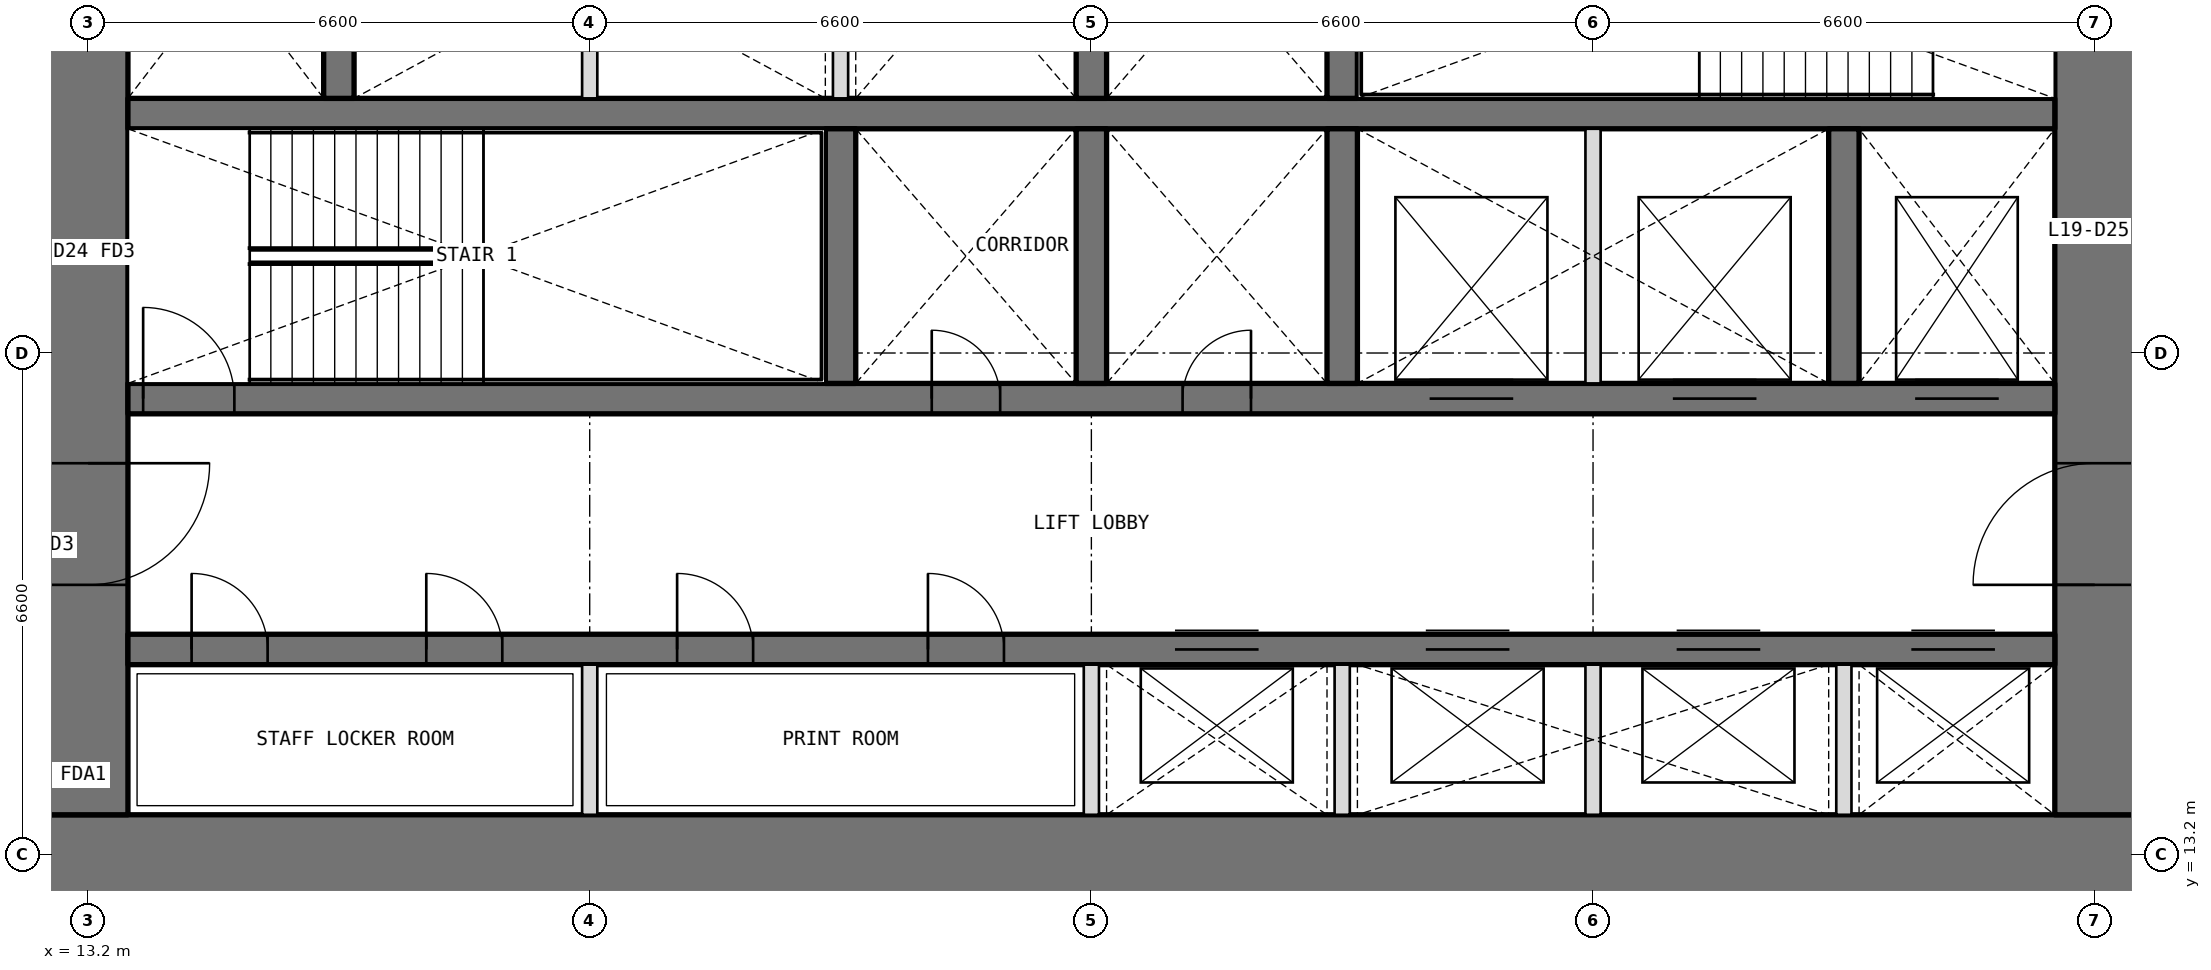
"""IFC4 building model, lengths in metres.
Left out: names, types, materials, properties, quantities, classifications, styles, units other than length and angle.
Written with IfcOpenShell. Run it as: python <this file> out.ifc"""

import sys

from ifc_helpers import new_model, si_unit, direction, frame, frame_2d, origin, place, context, subcontext, project, spatial, rectangle, extrude, element, fill, save


model = new_model("IFC4")
c1 = context("Model", 3, precision=1e-05, world=origin(), true_north=direction((0.0, 1.0)))
c2 = subcontext(c1, "Body", "Model", "MODEL_VIEW")
j1 = project(units=[si_unit("LENGTHUNIT", "METRE"), si_unit("PLANEANGLEUNIT", "RADIAN")], contexts=[c1])
p1 = place(None, origin())
s1 = spatial("IfcSite", under=j1, at=p1, CompositionType="ELEMENT")
p2 = place(p1, origin())
s2 = spatial("IfcBuilding", under=s1, at=p2, CompositionType="ELEMENT")
p3 = place(p2, frame((0.0, 0.0, 86.4)))
s3 = spatial("IfcBuildingStorey", under=s2, at=p3, CompositionType="ELEMENT", Elevation=86.4)
p4 = place(p3, frame((12.675, 13.2, 0.0), z_axis=(0.0, 0.0, 1.0), x_axis=(1.0, 0.0, 0.0)))
e1 = element("IfcWall", 1, at=p4, inside=s3, PredefinedType="SHEAR", context=c2, shape_type="SweptSolid", body=[
    extrude(rectangle(XDim=27.45, YDim=1.05, at=frame_2d((13.725, 0.0))), origin(), (0.0, 0.0, 1.0), 4.2),
])
p5 = place(p3, frame((39.6, 13.725, 0.0), z_axis=(0.0, 0.0, 1.0), x_axis=(0.0, 1.0, 0.0)))
e2 = element("IfcWall", 2, at=p5, inside=s3, PredefinedType="SHEAR", context=c2, shape_type="SweptSolid", body=[
    extrude(rectangle(XDim=18.75, YDim=1.05, at=frame_2d((9.375, 0.0))), origin(), (0.0, 0.0, 1.0), 4.2),
])
p6 = place(p5, frame((3.025, 0.0, 0.0)))
e3 = element("IfcOpeningElement", 3, at=p6, cuts=e2, PredefinedType="OPENING", context=c2, shape_type="SweptSolid", body=[
    extrude(rectangle(XDim=1.6, YDim=2.1, at=frame_2d((0.8, 1.05))), frame((0.0, 0.535, 0.0), z_axis=(0.0, -1.0, 0.0), x_axis=(1.0, 0.0, 0.0)), (0.0, 0.0, 1.0), 1.07),
])
p7 = place(p5, frame((13.825, 0.0, 0.0)))
e4 = element("IfcOpeningElement", 4, at=p7, cuts=e2, PredefinedType="OPENING", context=c2, shape_type="SweptSolid", body=[
    extrude(rectangle(XDim=1.6, YDim=2.1, at=frame_2d((0.8, 1.05))), frame((0.0, 0.535, 0.0), z_axis=(0.0, -1.0, 0.0), x_axis=(1.0, 0.0, 0.0)), (0.0, 0.0, 1.0), 1.07),
])
p8 = place(p3, frame((13.2, 32.475, 0.0), z_axis=(0.0, 0.0, 1.0), x_axis=(0.0, -1.0, 0.0)))
e5 = element("IfcWall", 5, at=p8, inside=s3, PredefinedType="SHEAR", context=c2, shape_type="SweptSolid", body=[
    extrude(rectangle(XDim=18.75, YDim=1.05, at=frame_2d((9.375, 0.0))), origin(), (0.0, 0.0, 1.0), 4.2),
])
p9 = place(p8, frame((14.125, 0.0, 0.0)))
e6 = element("IfcOpeningElement", 6, at=p9, cuts=e5, PredefinedType="OPENING", context=c2, shape_type="SweptSolid", body=[
    extrude(rectangle(XDim=1.6, YDim=2.1, at=frame_2d((0.8, 1.05))), frame((0.0, 0.535, 0.0), z_axis=(0.0, -1.0, 0.0), x_axis=(1.0, 0.0, 0.0)), (0.0, 0.0, 1.0), 1.07),
])
p10 = place(p8, frame((3.325, 0.0, 0.0)))
e7 = element("IfcOpeningElement", 7, at=p10, cuts=e5, PredefinedType="OPENING", context=c2, shape_type="SweptSolid", body=[
    extrude(rectangle(XDim=1.6, YDim=2.1, at=frame_2d((0.8, 1.05))), frame((0.0, 0.535, 0.0), z_axis=(0.0, -1.0, 0.0), x_axis=(1.0, 0.0, 0.0)), (0.0, 0.0, 1.0), 1.07),
])
p11 = place(p3, frame((13.725, 15.9, 0.0), z_axis=(0.0, 0.0, 1.0), x_axis=(1.0, 0.0, 0.0)))
e8 = element("IfcWall", 8, at=p11, inside=s3, PredefinedType="SHEAR", context=c2, shape_type="SweptSolid", body=[
    extrude(rectangle(XDim=25.35, YDim=0.4, at=frame_2d((12.675, 0.0))), origin(), (0.0, 0.0, 1.0), 4.2),
])
p12 = place(p11, frame((0.837, 0.0, 0.0)))
e9 = element("IfcOpeningElement", 9, at=p12, cuts=e8, PredefinedType="OPENING", context=c2, shape_type="SweptSolid", body=[
    extrude(rectangle(XDim=1.0, YDim=2.1, at=frame_2d((0.5, 1.05))), frame((0.0, 0.21, 0.0), z_axis=(0.0, -1.0, 0.0), x_axis=(1.0, 0.0, 0.0)), (0.0, 0.0, 1.0), 0.42),
])
p13 = place(p11, frame((3.925, 0.0, 0.0)))
e10 = element("IfcOpeningElement", 10, at=p13, cuts=e8, PredefinedType="OPENING", context=c2, shape_type="SweptSolid", body=[
    extrude(rectangle(XDim=1.0, YDim=2.1, at=frame_2d((0.5, 1.05))), frame((0.0, 0.21, 0.0), z_axis=(0.0, -1.0, 0.0), x_axis=(1.0, 0.0, 0.0)), (0.0, 0.0, 1.0), 0.42),
])
p14 = place(p11, frame((7.225, 0.0, 0.0)))
e11 = element("IfcOpeningElement", 11, at=p14, cuts=e8, PredefinedType="OPENING", context=c2, shape_type="SweptSolid", body=[
    extrude(rectangle(XDim=1.0, YDim=2.1, at=frame_2d((0.5, 1.05))), frame((0.0, 0.21, 0.0), z_axis=(0.0, -1.0, 0.0), x_axis=(1.0, 0.0, 0.0)), (0.0, 0.0, 1.0), 0.42),
])
p15 = place(p11, frame((10.525, 0.0, 0.0)))
e12 = element("IfcOpeningElement", 12, at=p15, cuts=e8, PredefinedType="OPENING", context=c2, shape_type="SweptSolid", body=[
    extrude(rectangle(XDim=1.0, YDim=2.1, at=frame_2d((0.5, 1.05))), frame((0.0, 0.21, 0.0), z_axis=(0.0, -1.0, 0.0), x_axis=(1.0, 0.0, 0.0)), (0.0, 0.0, 1.0), 0.42),
])
p16 = place(p11, frame((13.775, 0.0, 0.0)))
e13 = element("IfcOpeningElement", 13, at=p16, cuts=e8, PredefinedType="OPENING", context=c2, shape_type="SweptSolid", body=[
    extrude(rectangle(XDim=1.1, YDim=2.1, at=frame_2d((0.55, 1.05))), frame((0.0, 0.21, 0.0), z_axis=(0.0, -1.0, 0.0), x_axis=(1.0, 0.0, 0.0)), (0.0, 0.0, 1.0), 0.42),
])
p17 = place(p11, frame((17.075, 0.0, 0.0)))
e14 = element("IfcOpeningElement", 14, at=p17, cuts=e8, PredefinedType="OPENING", context=c2, shape_type="SweptSolid", body=[
    extrude(rectangle(XDim=1.1, YDim=2.1, at=frame_2d((0.55, 1.05))), frame((0.0, 0.21, 0.0), z_axis=(0.0, -1.0, 0.0), x_axis=(1.0, 0.0, 0.0)), (0.0, 0.0, 1.0), 0.42),
])
p18 = place(p11, frame((20.375, 0.0, 0.0)))
e15 = element("IfcOpeningElement", 15, at=p18, cuts=e8, PredefinedType="OPENING", context=c2, shape_type="SweptSolid", body=[
    extrude(rectangle(XDim=1.1, YDim=2.1, at=frame_2d((0.55, 1.05))), frame((0.0, 0.21, 0.0), z_axis=(0.0, -1.0, 0.0), x_axis=(1.0, 0.0, 0.0)), (0.0, 0.0, 1.0), 0.42),
])
p19 = place(p11, frame((23.462, 0.0, 0.0)))
e16 = element("IfcOpeningElement", 16, at=p19, cuts=e8, PredefinedType="OPENING", context=c2, shape_type="SweptSolid", body=[
    extrude(rectangle(XDim=1.1, YDim=2.1, at=frame_2d((0.55, 1.05))), frame((0.0, 0.21, 0.0), z_axis=(0.0, -1.0, 0.0), x_axis=(1.0, 0.0, 0.0)), (0.0, 0.0, 1.0), 0.42),
])
p20 = place(p3, frame((13.725, 19.2, 0.0), z_axis=(0.0, 0.0, 1.0), x_axis=(1.0, 0.0, 0.0)))
e17 = element("IfcWall", 17, at=p20, inside=s3, PredefinedType="SHEAR", context=c2, shape_type="SweptSolid", body=[
    extrude(rectangle(XDim=25.35, YDim=0.4, at=frame_2d((12.675, 0.0))), origin(), (0.0, 0.0, 1.0), 4.2),
])
p21 = place(p20, frame((10.575, 0.0, 0.0)))
e18 = element("IfcOpeningElement", 18, at=p21, cuts=e17, PredefinedType="OPENING", context=c2, shape_type="SweptSolid", body=[
    extrude(rectangle(XDim=0.9, YDim=2.1, at=frame_2d((0.45, 1.05))), frame((0.0, 0.21, 0.0), z_axis=(0.0, -1.0, 0.0), x_axis=(1.0, 0.0, 0.0)), (0.0, 0.0, 1.0), 0.42),
])
p22 = place(p20, frame((13.875, 0.0, 0.0)))
e19 = element("IfcOpeningElement", 19, at=p22, cuts=e17, PredefinedType="OPENING", context=c2, shape_type="SweptSolid", body=[
    extrude(rectangle(XDim=0.9, YDim=2.1, at=frame_2d((0.45, 1.05))), frame((0.0, 0.21, 0.0), z_axis=(0.0, -1.0, 0.0), x_axis=(1.0, 0.0, 0.0)), (0.0, 0.0, 1.0), 0.42),
])
p23 = place(p20, frame((0.2, 0.0, 0.0)))
e20 = element("IfcOpeningElement", 20, at=p23, cuts=e17, PredefinedType="OPENING", context=c2, shape_type="SweptSolid", body=[
    extrude(rectangle(XDim=1.2, YDim=2.1, at=frame_2d((0.6, 1.05))), frame((0.0, 0.21, 0.0), z_axis=(0.0, -1.0, 0.0), x_axis=(1.0, 0.0, 0.0)), (0.0, 0.0, 1.0), 0.42),
])
p24 = place(p20, frame((23.512, 0.0, 0.0)))
e21 = element("IfcOpeningElement", 21, at=p24, cuts=e17, PredefinedType="OPENING", context=c2, shape_type="SweptSolid", body=[
    extrude(rectangle(XDim=1.1, YDim=2.1, at=frame_2d((0.55, 1.05))), frame((0.0, 0.21, 0.0), z_axis=(0.0, -1.0, 0.0), x_axis=(1.0, 0.0, 0.0)), (0.0, 0.0, 1.0), 0.42),
])
p25 = place(p20, frame((17.125, 0.0, 0.0)))
e22 = element("IfcOpeningElement", 22, at=p25, cuts=e17, PredefinedType="OPENING", context=c2, shape_type="SweptSolid", body=[
    extrude(rectangle(XDim=1.1, YDim=2.1, at=frame_2d((0.55, 1.05))), frame((0.0, 0.21, 0.0), z_axis=(0.0, -1.0, 0.0), x_axis=(1.0, 0.0, 0.0)), (0.0, 0.0, 1.0), 0.42),
])
p26 = place(p20, frame((20.325, 0.0, 0.0)))
e23 = element("IfcOpeningElement", 23, at=p26, cuts=e17, PredefinedType="OPENING", context=c2, shape_type="SweptSolid", body=[
    extrude(rectangle(XDim=1.1, YDim=2.1, at=frame_2d((0.55, 1.05))), frame((0.0, 0.21, 0.0), z_axis=(0.0, -1.0, 0.0), x_axis=(1.0, 0.0, 0.0)), (0.0, 0.0, 1.0), 0.42),
])
p27 = place(p3, frame((13.725, 22.95, 0.0), z_axis=(0.0, 0.0, 1.0), x_axis=(1.0, 0.0, 0.0)))
e24 = element("IfcWall", 24, at=p27, inside=s3, PredefinedType="SHEAR", context=c2, shape_type="SweptSolid", body=[
    extrude(rectangle(XDim=25.35, YDim=0.4, at=frame_2d((12.675, 0.0))), origin(), (0.0, 0.0, 1.0), 4.2),
])
for number, where, z_axis, x_axis in (
    (25, (23.1, 19.4, 0.0), (0.0, 0.0, 1.0), (0.0, 1.0, 0.0)),
    (26, (26.4, 19.4, 0.0), (0.0, 0.0, 1.0), (0.0, 1.0, 0.0)),
    (27, (29.7, 19.4, 0.0), (0.0, 0.0, 1.0), (0.0, 1.0, 0.0)),
    (28, (36.3, 19.4, 0.0), (0.0, 0.0, 1.0), (0.0, 1.0, 0.0)),
    (29, (16.5, 23.15, 0.0), (0.0, 0.0, 1.0), (0.0, 1.0, 0.0)),
    (30, (26.4, 23.15, 0.0), (0.0, 0.0, 1.0), (0.0, 1.0, 0.0)),
    (31, (29.7, 23.15, 0.0), (0.0, 0.0, 1.0), (0.0, 1.0, 0.0)),
):
    element("IfcWall", number, at=place(p3, frame(where, z_axis=z_axis, x_axis=x_axis)), inside=s3, PredefinedType="SHEAR", context=c2, shape_type="SweptSolid", body=[
        extrude(rectangle(XDim=3.35, YDim=0.4, at=frame_2d((1.675, 0.0))), origin(), (0.0, 0.0, 1.0), 4.2),
    ])
for number, where, z_axis, x_axis in (
    (32, (19.8, 13.725, 0.0), (0.0, 0.0, 1.0), (0.0, 1.0, 0.0)),
    (33, (26.4, 13.725, 0.0), (0.0, 0.0, 1.0), (0.0, 1.0, 0.0)),
    (34, (29.7, 13.725, 0.0), (0.0, 0.0, 1.0), (0.0, 1.0, 0.0)),
    (35, (33.0, 13.725, 0.0), (0.0, 0.0, 1.0), (0.0, 1.0, 0.0)),
    (36, (36.3, 13.725, 0.0), (0.0, 0.0, 1.0), (0.0, 1.0, 0.0)),
):
    element("IfcWall", number, at=place(p3, frame(where, z_axis=z_axis, x_axis=x_axis)), inside=s3, PredefinedType="PARTITIONING", context=c2, shape_type="SweptSolid", body=[
        extrude(rectangle(XDim=1.975, YDim=0.2, at=frame_2d((0.987, 0.0))), origin(), (0.0, 0.0, 1.0), 4.2),
    ])
for number, where, z_axis, x_axis in (
    (37, (33.0, 19.4, 0.0), (0.0, 0.0, 1.0), (0.0, 1.0, 0.0)),
    (38, (19.8, 23.15, 0.0), (0.0, 0.0, 1.0), (0.0, 1.0, 0.0)),
    (39, (23.1, 23.15, 0.0), (0.0, 0.0, 1.0), (0.0, 1.0, 0.0)),
):
    element("IfcWall", number, at=place(p3, frame(where, z_axis=z_axis, x_axis=x_axis)), inside=s3, PredefinedType="PARTITIONING", context=c2, shape_type="SweptSolid", body=[
        extrude(rectangle(XDim=3.35, YDim=0.2, at=frame_2d((1.675, 0.0))), origin(), (0.0, 0.0, 1.0), 4.2),
    ])
p28 = place(p21, origin())
e40 = element("IfcDoor", 40, at=p28, inside=s3, OperationType="SINGLE_SWING_LEFT", PredefinedType="DOOR", context=c2, shape_type="SweptSolid", body=[
    extrude(rectangle(XDim=0.9, YDim=2.1, at=frame_2d((0.45, 1.05))), frame((0.0, 0.025, 0.0), z_axis=(0.0, -1.0, 0.0), x_axis=(1.0, 0.0, 0.0)), (0.0, 0.0, 1.0), 0.05),
])
fill(e18, e40)
p29 = place(p22, origin())
e41 = element("IfcDoor", 41, at=p29, inside=s3, OperationType="SINGLE_SWING_RIGHT", PredefinedType="DOOR", context=c2, shape_type="SweptSolid", body=[
    extrude(rectangle(XDim=0.9, YDim=2.1, at=frame_2d((0.45, 1.05))), frame((0.0, 0.025, 0.0), z_axis=(0.0, -1.0, 0.0), x_axis=(1.0, 0.0, 0.0)), (0.0, 0.0, 1.0), 0.05),
])
fill(e19, e41)
p30 = place(p12, origin())
e42 = element("IfcDoor", 42, at=p30, inside=s3, OperationType="SINGLE_SWING_LEFT", PredefinedType="DOOR", context=c2, shape_type="SweptSolid", body=[
    extrude(rectangle(XDim=1.0, YDim=2.1, at=frame_2d((0.5, 1.05))), frame((0.0, 0.025, 0.0), z_axis=(0.0, -1.0, 0.0), x_axis=(1.0, 0.0, 0.0)), (0.0, 0.0, 1.0), 0.05),
])
fill(e9, e42)
p31 = place(p13, origin())
e43 = element("IfcDoor", 43, at=p31, inside=s3, OperationType="SINGLE_SWING_LEFT", PredefinedType="DOOR", context=c2, shape_type="SweptSolid", body=[
    extrude(rectangle(XDim=1.0, YDim=2.1, at=frame_2d((0.5, 1.05))), frame((0.0, 0.025, 0.0), z_axis=(0.0, -1.0, 0.0), x_axis=(1.0, 0.0, 0.0)), (0.0, 0.0, 1.0), 0.05),
])
fill(e10, e43)
p32 = place(p14, origin())
e44 = element("IfcDoor", 44, at=p32, inside=s3, OperationType="SINGLE_SWING_LEFT", PredefinedType="DOOR", context=c2, shape_type="SweptSolid", body=[
    extrude(rectangle(XDim=1.0, YDim=2.1, at=frame_2d((0.5, 1.05))), frame((0.0, 0.025, 0.0), z_axis=(0.0, -1.0, 0.0), x_axis=(1.0, 0.0, 0.0)), (0.0, 0.0, 1.0), 0.05),
])
fill(e11, e44)
p33 = place(p15, origin())
e45 = element("IfcDoor", 45, at=p33, inside=s3, OperationType="SINGLE_SWING_LEFT", PredefinedType="DOOR", context=c2, shape_type="SweptSolid", body=[
    extrude(rectangle(XDim=1.0, YDim=2.1, at=frame_2d((0.5, 1.05))), frame((0.0, 0.025, 0.0), z_axis=(0.0, -1.0, 0.0), x_axis=(1.0, 0.0, 0.0)), (0.0, 0.0, 1.0), 0.05),
])
fill(e12, e45)
p34 = place(p23, origin())
e46 = element("IfcDoor", 46, at=p34, inside=s3, OperationType="SINGLE_SWING_LEFT", PredefinedType="DOOR", context=c2, shape_type="SweptSolid", body=[
    extrude(rectangle(XDim=1.2, YDim=2.1, at=frame_2d((0.6, 1.05))), frame((0.0, 0.025, 0.0), z_axis=(0.0, -1.0, 0.0), x_axis=(1.0, 0.0, 0.0)), (0.0, 0.0, 1.0), 0.05),
])
fill(e20, e46)
p35 = place(p9, origin())
e47 = element("IfcDoor", 47, at=p35, inside=s3, OperationType="DOUBLE_DOOR_DOUBLE_SWING", PredefinedType="DOOR", context=c2, shape_type="SweptSolid", body=[
    extrude(rectangle(XDim=1.6, YDim=2.1, at=frame_2d((0.8, 1.05))), frame((0.0, 0.025, 0.0), z_axis=(0.0, -1.0, 0.0), x_axis=(1.0, 0.0, 0.0)), (0.0, 0.0, 1.0), 0.05),
])
fill(e6, e47)
p36 = place(p6, origin())
e48 = element("IfcDoor", 48, at=p36, inside=s3, OperationType="DOUBLE_DOOR_DOUBLE_SWING", PredefinedType="DOOR", context=c2, shape_type="SweptSolid", body=[
    extrude(rectangle(XDim=1.6, YDim=2.1, at=frame_2d((0.8, 1.05))), frame((0.0, 0.025, 0.0), z_axis=(0.0, -1.0, 0.0), x_axis=(1.0, 0.0, 0.0)), (0.0, 0.0, 1.0), 0.05),
])
fill(e3, e48)
p37 = place(p16, origin())
e49 = element("IfcDoor", 49, at=p37, inside=s3, OperationType="DOUBLE_DOOR_SLIDING", PredefinedType="DOOR", context=c2, shape_type="SweptSolid", body=[
    extrude(rectangle(XDim=1.1, YDim=2.1, at=frame_2d((0.55, 1.05))), frame((0.0, 0.025, 0.0), z_axis=(0.0, -1.0, 0.0), x_axis=(1.0, 0.0, 0.0)), (0.0, 0.0, 1.0), 0.05),
])
fill(e13, e49)
p38 = place(p17, origin())
e50 = element("IfcDoor", 50, at=p38, inside=s3, OperationType="DOUBLE_DOOR_SLIDING", PredefinedType="DOOR", context=c2, shape_type="SweptSolid", body=[
    extrude(rectangle(XDim=1.1, YDim=2.1, at=frame_2d((0.55, 1.05))), frame((0.0, 0.025, 0.0), z_axis=(0.0, -1.0, 0.0), x_axis=(1.0, 0.0, 0.0)), (0.0, 0.0, 1.0), 0.05),
])
fill(e14, e50)
p39 = place(p18, origin())
e51 = element("IfcDoor", 51, at=p39, inside=s3, OperationType="DOUBLE_DOOR_SLIDING", PredefinedType="DOOR", context=c2, shape_type="SweptSolid", body=[
    extrude(rectangle(XDim=1.1, YDim=2.1, at=frame_2d((0.55, 1.05))), frame((0.0, 0.025, 0.0), z_axis=(0.0, -1.0, 0.0), x_axis=(1.0, 0.0, 0.0)), (0.0, 0.0, 1.0), 0.05),
])
fill(e15, e51)
p40 = place(p19, origin())
e52 = element("IfcDoor", 52, at=p40, inside=s3, OperationType="DOUBLE_DOOR_SLIDING", PredefinedType="DOOR", context=c2, shape_type="SweptSolid", body=[
    extrude(rectangle(XDim=1.1, YDim=2.1, at=frame_2d((0.55, 1.05))), frame((0.0, 0.025, 0.0), z_axis=(0.0, -1.0, 0.0), x_axis=(1.0, 0.0, 0.0)), (0.0, 0.0, 1.0), 0.05),
])
fill(e16, e52)
p41 = place(p24, origin())
e53 = element("IfcDoor", 53, at=p41, inside=s3, OperationType="DOUBLE_DOOR_SLIDING", PredefinedType="DOOR", context=c2, shape_type="SweptSolid", body=[
    extrude(rectangle(XDim=1.1, YDim=2.1, at=frame_2d((0.55, 1.05))), frame((0.0, 0.025, 0.0), z_axis=(0.0, -1.0, 0.0), x_axis=(1.0, 0.0, 0.0)), (0.0, 0.0, 1.0), 0.05),
])
fill(e21, e53)
p42 = place(p25, origin())
e54 = element("IfcDoor", 54, at=p42, inside=s3, OperationType="DOUBLE_DOOR_SLIDING", PredefinedType="DOOR", context=c2, shape_type="SweptSolid", body=[
    extrude(rectangle(XDim=1.1, YDim=2.1, at=frame_2d((0.55, 1.05))), frame((0.0, 0.025, 0.0), z_axis=(0.0, -1.0, 0.0), x_axis=(1.0, 0.0, 0.0)), (0.0, 0.0, 1.0), 0.05),
])
fill(e22, e54)
p43 = place(p26, origin())
e55 = element("IfcDoor", 55, at=p43, inside=s3, OperationType="DOUBLE_DOOR_SLIDING", PredefinedType="DOOR", context=c2, shape_type="SweptSolid", body=[
    extrude(rectangle(XDim=1.1, YDim=2.1, at=frame_2d((0.55, 1.05))), frame((0.0, 0.025, 0.0), z_axis=(0.0, -1.0, 0.0), x_axis=(1.0, 0.0, 0.0)), (0.0, 0.0, 1.0), 0.05),
])
fill(e23, e55)
save(model, sys.argv[1])
